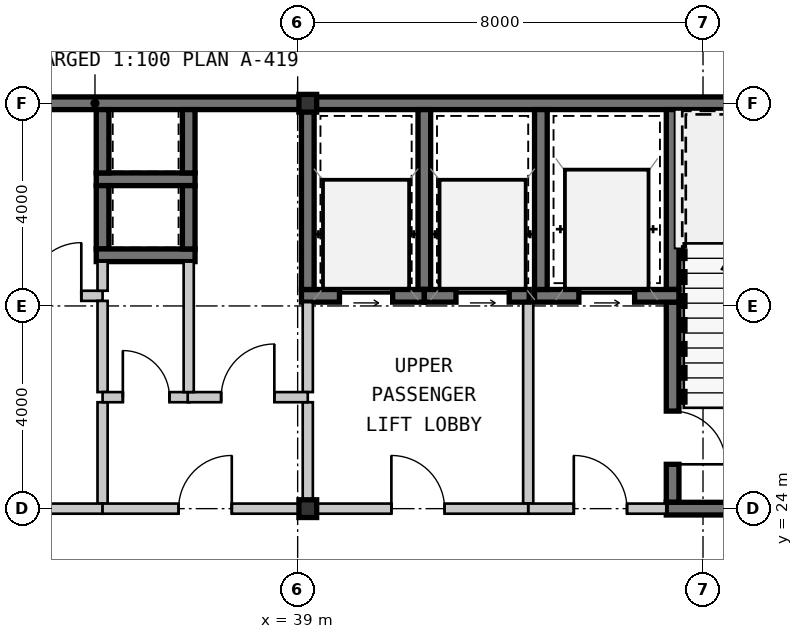
"""IFC4 building model, lengths in metres.
Left out: names, types, materials, properties, quantities, classifications, styles, units other than length and angle.
Written with IfcOpenShell. Run it as: python <this file> out.ifc"""

import sys

from ifc_helpers import new_model, si_unit, direction, frame, frame_2d, origin, origin_2d, place, context, subcontext, project, spatial, rectangle, hollow_rectangle, extrude, source, transform, mapped, element, fill, save


model = new_model("IFC4")
c1 = context("Model", 3, precision=1e-05, world=origin(), true_north=direction((0.0, 1.0)))
c2 = subcontext(c1, "Body", "Model", "MODEL_VIEW")
j1 = project(units=[si_unit("LENGTHUNIT", "METRE"), si_unit("PLANEANGLEUNIT", "RADIAN")], contexts=[c1])
p1 = place(None, origin())
s1 = spatial("IfcSite", under=j1, at=p1, CompositionType="ELEMENT")
p2 = place(p1, origin())
s2 = spatial("IfcBuilding", under=s1, at=p2, CompositionType="ELEMENT")
p3 = place(p2, frame((0.0, 0.0, 178.85)))
s3 = spatial("IfcBuildingStorey", under=s2, at=p3, CompositionType="ELEMENT", Elevation=178.85)
m1 = source(origin(), c2, "Body", "SweptSolid", [
    extrude(hollow_rectangle(XDim=0.35, YDim=0.35, WallThickness=0.016, at=origin_2d()), origin(), (0.0, 0.0, 1.0), 3.15),
])
for number, where, z_axis, x_axis in (
    (1, (39.2, 24.0, 0.0), (0.0, 0.0, 1.0), (1.0, 0.0, 0.0)),
    (2, (39.2, 32.0, 0.0), (0.0, 0.0, 1.0), (1.0, 0.0, 0.0)),
):
    element("IfcColumn", number, at=place(p3, frame(where, z_axis=z_axis, x_axis=x_axis)), inside=s3, PredefinedType="COLUMN", context=c2, shape_type="MappedRepresentation", body=[
        mapped(m1, transform((0.0, 0.0, 0.0), scale=1.0)),
    ])
m2 = source(origin(), c2, "Body", "SweptSolid", [
    extrude(rectangle(XDim=11.2, YDim=0.25, at=frame_2d((5.6, 0.0))), origin(), (0.0, 0.0, 1.0), 2.93),
])
p4 = place(p3, frame((28.0, 32.0, 0.0), z_axis=(0.0, 0.0, 1.0), x_axis=(1.0, 0.0, 0.0)))
e3 = element("IfcWall", 3, at=p4, inside=s3, PredefinedType="SHEAR", context=c2, shape_type="MappedRepresentation", body=[
    mapped(m2, transform((0.0, 0.0, 0.0), scale=1.0)),
])
m3 = source(origin(), c2, "Body", "SweptSolid", [
    extrude(rectangle(XDim=11.925, YDim=0.25, at=frame_2d((5.962, 0.0))), origin(), (0.0, 0.0, 1.0), 2.93),
])
p5 = place(p3, frame((39.2, 32.0, 0.0), z_axis=(0.0, 0.0, 1.0), x_axis=(1.0, 0.0, 0.0)))
e4 = element("IfcWall", 4, at=p5, inside=s3, PredefinedType="SHEAR", context=c2, shape_type="MappedRepresentation", body=[
    mapped(m3, transform((0.0, 0.0, 0.0), scale=1.0)),
])
m4 = source(origin(), c2, "Body", "SweptSolid", [
    extrude(rectangle(XDim=3.55, YDim=0.25, at=frame_2d((1.775, 0.0))), origin(), (0.0, 0.0, 1.0), 2.93),
])
p6 = place(p3, frame((46.4, 31.875, 0.0), z_axis=(0.0, 0.0, 1.0), x_axis=(0.0, -1.0, 0.0)))
e5 = element("IfcWall", 5, at=p6, inside=s3, PredefinedType="SHEAR", context=c2, shape_type="MappedRepresentation", body=[
    mapped(m4, transform((0.0, 0.0, 0.0), scale=1.0)),
])
m5 = source(origin(), c2, "Body", "SweptSolid", [
    extrude(rectangle(XDim=3.95, YDim=0.25, at=frame_2d((1.975, 0.0))), origin(), (0.0, 0.0, 1.0), 2.93),
])
p7 = place(p3, frame((46.4, 28.075, 0.0), z_axis=(0.0, 0.0, 1.0), x_axis=(0.0, -1.0, 0.0)))
e6 = element("IfcWall", 6, at=p7, inside=s3, PredefinedType="SHEAR", context=c2, shape_type="MappedRepresentation", body=[
    mapped(m5, transform((0.0, 0.0, 0.0), scale=1.0)),
])
m6 = source(origin(), c2, "Body", "SweptSolid", [
    extrude(rectangle(XDim=1.05, YDim=2.1, at=frame_2d((0.525, 1.05))), frame((0.0, 0.135, 0.0), z_axis=(0.0, -1.0, 0.0), x_axis=(1.0, 0.0, 0.0)), (0.0, 0.0, 1.0), 0.27),
])
p8 = place(p7, frame((2.15, 0.0, 0.0)))
e7 = element("IfcOpeningElement", 7, at=p8, cuts=e6, PredefinedType="OPENING", context=c2, shape_type="MappedRepresentation", body=[
    mapped(m6, transform((0.0, 0.0, 0.0), scale=1.0)),
])
m7 = source(origin(), c2, "Body", "SweptSolid", [
    extrude(rectangle(XDim=4.85, YDim=0.25, at=frame_2d((2.425, 0.0))), origin(), (0.0, 0.0, 1.0), 2.93),
])
p9 = place(p3, frame((46.275, 24.0, 0.0), z_axis=(0.0, 0.0, 1.0), x_axis=(1.0, 0.0, 0.0)))
e8 = element("IfcWall", 8, at=p9, inside=s3, PredefinedType="SHEAR", context=c2, shape_type="MappedRepresentation", body=[
    mapped(m7, transform((0.0, 0.0, 0.0), scale=1.0)),
])
m8 = source(origin(), c2, "Body", "SweptSolid", [
    extrude(rectangle(XDim=2.85, YDim=0.25, at=frame_2d((1.425, 0.0))), origin(), (0.0, 0.0, 1.0), 2.93),
])
p10 = place(p3, frame((43.675, 28.2, 0.0), z_axis=(0.0, 0.0, 1.0), x_axis=(1.0, 0.0, 0.0)))
e9 = element("IfcWall", 9, at=p10, inside=s3, PredefinedType="SHEAR", context=c2, shape_type="MappedRepresentation", body=[
    mapped(m8, transform((0.0, 0.0, 0.0), scale=1.0)),
])
m9 = source(origin(), c2, "Body", "SweptSolid", [
    extrude(rectangle(XDim=1.1, YDim=2.15, at=frame_2d((0.55, 1.075))), frame((0.0, 0.135, 0.0), z_axis=(0.0, -1.0, 0.0), x_axis=(1.0, 0.0, 0.0)), (0.0, 0.0, 1.0), 0.27),
])
p11 = place(p10, frame((0.875, 0.0, 0.0)))
e10 = element("IfcOpeningElement", 10, at=p11, cuts=e9, PredefinedType="OPENING", context=c2, shape_type="MappedRepresentation", body=[
    mapped(m9, transform((0.0, 0.0, 0.0), scale=1.0)),
])
p12 = place(p3, frame((43.8, 31.875, 0.0), z_axis=(0.0, 0.0, 1.0), x_axis=(0.0, -1.0, 0.0)))
e11 = element("IfcWall", 11, at=p12, inside=s3, PredefinedType="SHEAR", context=c2, shape_type="MappedRepresentation", body=[
    mapped(m4, transform((0.0, 0.0, 0.0), scale=1.0)),
])
m10 = source(origin(), c2, "Body", "SweptSolid", [
    extrude(rectangle(XDim=3.975, YDim=0.2, at=frame_2d((1.987, 0.0))), origin(), (0.0, 0.0, 1.0), 2.93),
])
p13 = place(p3, frame((43.55, 28.075, 0.0), z_axis=(0.0, 0.0, 1.0), x_axis=(0.0, -1.0, 0.0)))
e12 = element("IfcWall", 12, at=p13, inside=s3, PredefinedType="SOLIDWALL", context=c2, shape_type="MappedRepresentation", body=[
    mapped(m10, transform((0.0, 0.0, 0.0), scale=1.0)),
])
m11 = source(origin(), c2, "Body", "SweptSolid", [
    extrude(rectangle(XDim=2.725, YDim=0.2, at=frame_2d((1.362, 0.0))), origin(), (0.0, 0.0, 1.0), 2.397),
])
p14 = place(p3, frame((43.55, 24.0, 0.0), z_axis=(0.0, 0.0, 1.0), x_axis=(1.0, 0.0, 0.0)))
e13 = element("IfcWall", 13, at=p14, inside=s3, PredefinedType="SOLIDWALL", context=c2, shape_type="MappedRepresentation", body=[
    mapped(m11, transform((0.0, 0.0, 0.0), scale=1.0)),
])
m12 = source(origin(), c2, "Body", "SweptSolid", [
    extrude(rectangle(XDim=1.05, YDim=2.1, at=frame_2d((0.525, 1.05))), frame((0.0, 0.11, 0.0), z_axis=(0.0, -1.0, 0.0), x_axis=(1.0, 0.0, 0.0)), (0.0, 0.0, 1.0), 0.22),
])
p15 = place(p14, frame((0.9, 0.0, 0.0)))
e14 = element("IfcOpeningElement", 14, at=p15, cuts=e13, PredefinedType="OPENING", context=c2, shape_type="MappedRepresentation", body=[
    mapped(m12, transform((0.0, 0.0, 0.0), scale=1.0)),
])
m13 = source(origin(), c2, "Body", "SweptSolid", [
    extrude(rectangle(XDim=1.95, YDim=0.25, at=frame_2d((0.975, 0.0))), origin(), (0.0, 0.0, 1.0), 2.93),
])
p16 = place(p3, frame((35.025, 30.5, 0.0), z_axis=(0.0, 0.0, 1.0), x_axis=(1.0, 0.0, 0.0)))
e15 = element("IfcWall", 15, at=p16, inside=s3, PredefinedType="SHEAR", context=c2, shape_type="MappedRepresentation", body=[
    mapped(m13, transform((0.0, 0.0, 0.0), scale=1.0)),
])
m14 = source(origin(), c2, "Body", "SweptSolid", [
    extrude(rectangle(XDim=1.25, YDim=0.25, at=frame_2d((0.625, 0.0))), origin(), (0.0, 0.0, 1.0), 2.93),
])
for number, where, z_axis, x_axis in (
    (16, (35.15, 31.875, 0.0), (0.0, 0.0, 1.0), (0.0, -1.0, 0.0)),
    (17, (36.85, 30.625, 0.0), (0.0, 0.0, 1.0), (0.0, 1.0, 0.0)),
    (18, (35.15, 30.375, 0.0), (0.0, 0.0, 1.0), (0.0, -1.0, 0.0)),
):
    element("IfcWall", number, at=place(p3, frame(where, z_axis=z_axis, x_axis=x_axis)), inside=s3, PredefinedType="SHEAR", context=c2, shape_type="MappedRepresentation", body=[
        mapped(m14, transform((0.0, 0.0, 0.0), scale=1.0)),
    ])
p17 = place(p3, frame((35.025, 29.0, 0.0), z_axis=(0.0, 0.0, 1.0), x_axis=(1.0, 0.0, 0.0)))
e19 = element("IfcWall", 19, at=p17, inside=s3, PredefinedType="SHEAR", context=c2, shape_type="MappedRepresentation", body=[
    mapped(m13, transform((0.0, 0.0, 0.0), scale=1.0)),
])
p18 = place(p3, frame((36.85, 29.125, 0.0), z_axis=(0.0, 0.0, 1.0), x_axis=(0.0, 1.0, 0.0)))
e20 = element("IfcWall", 20, at=p18, inside=s3, PredefinedType="SHEAR", context=c2, shape_type="MappedRepresentation", body=[
    mapped(m14, transform((0.0, 0.0, 0.0), scale=1.0)),
])
p19 = place(p3, frame((41.5, 28.325, 0.0), z_axis=(0.0, 0.0, 1.0), x_axis=(0.0, 1.0, 0.0)))
e21 = element("IfcWall", 21, at=p19, inside=s3, PredefinedType="SHEAR", context=c2, shape_type="MappedRepresentation", body=[
    mapped(m4, transform((0.0, 0.0, 0.0), scale=1.0)),
])
m15 = source(origin(), c2, "Body", "SweptSolid", [
    extrude(rectangle(XDim=2.425, YDim=0.25, at=frame_2d((1.212, 0.0))), origin(), (0.0, 0.0, 1.0), 2.93),
])
p20 = place(p3, frame((39.075, 28.2, 0.0), z_axis=(0.0, 0.0, 1.0), x_axis=(1.0, 0.0, 0.0)))
e22 = element("IfcWall", 22, at=p20, inside=s3, PredefinedType="SHEAR", context=c2, shape_type="MappedRepresentation", body=[
    mapped(m15, transform((0.0, 0.0, 0.0), scale=1.0)),
])
m16 = source(origin(), c2, "Body", "SweptSolid", [
    extrude(rectangle(XDim=1.05, YDim=2.15, at=frame_2d((0.525, 1.075))), frame((0.0, 0.135, 0.0), z_axis=(0.0, -1.0, 0.0), x_axis=(1.0, 0.0, 0.0)), (0.0, 0.0, 1.0), 0.27),
])
p21 = place(p20, frame((0.75, 0.0, 0.0)))
e23 = element("IfcOpeningElement", 23, at=p21, cuts=e22, PredefinedType="OPENING", context=c2, shape_type="MappedRepresentation", body=[
    mapped(m16, transform((0.0, 0.0, 0.0), scale=1.0)),
])
p22 = place(p3, frame((39.2, 31.875, 0.0), z_axis=(0.0, 0.0, 1.0), x_axis=(0.0, -1.0, 0.0)))
e24 = element("IfcWall", 24, at=p22, inside=s3, PredefinedType="SHEAR", context=c2, shape_type="MappedRepresentation", body=[
    mapped(m4, transform((0.0, 0.0, 0.0), scale=1.0)),
])
m17 = source(origin(), c2, "Body", "SweptSolid", [
    extrude(rectangle(XDim=2.07, YDim=0.25, at=frame_2d((1.035, 0.0))), origin(), (0.0, 0.0, 1.0), 2.93),
])
p23 = place(p3, frame((41.5, 28.2, 0.0), z_axis=(0.0, 0.0, 1.0), x_axis=(1.0, 0.0, 0.0)))
e25 = element("IfcWall", 25, at=p23, inside=s3, PredefinedType="SHEAR", context=c2, shape_type="MappedRepresentation", body=[
    mapped(m17, transform((0.0, 0.0, 0.0), scale=1.0)),
])
p24 = place(p23, frame((0.625, 0.0, 0.0)))
e26 = element("IfcOpeningElement", 26, at=p24, cuts=e25, PredefinedType="OPENING", context=c2, shape_type="MappedRepresentation", body=[
    mapped(m16, transform((0.0, 0.0, 0.0), scale=1.0)),
])
m18 = source(origin(), c2, "Body", "SweptSolid", [
    extrude(rectangle(XDim=2.0, YDim=0.2, at=frame_2d((1.0, 0.0))), origin(), (0.0, 0.0, 1.0), 2.47),
])
p25 = place(p3, frame((39.2, 24.1, 0.0), z_axis=(0.0, 0.0, 1.0), x_axis=(0.0, 1.0, 0.0)))
e27 = element("IfcWall", 27, at=p25, inside=s3, PredefinedType="SOLIDWALL", context=c2, shape_type="MappedRepresentation", body=[
    mapped(m18, transform((0.0, 0.0, 0.0), scale=1.0)),
])
m19 = source(origin(), c2, "Body", "SweptSolid", [
    extrude(rectangle(XDim=1.775, YDim=0.2, at=frame_2d((0.887, 0.0))), origin(), (0.0, 0.0, 1.0), 2.47),
])
p26 = place(p3, frame((39.2, 26.3, 0.0), z_axis=(0.0, 0.0, 1.0), x_axis=(0.0, 1.0, 0.0)))
e28 = element("IfcWall", 28, at=p26, inside=s3, PredefinedType="SOLIDWALL", context=c2, shape_type="MappedRepresentation", body=[
    mapped(m19, transform((0.0, 0.0, 0.0), scale=1.0)),
])
m20 = source(origin(), c2, "Body", "SweptSolid", [
    extrude(rectangle(XDim=4.35, YDim=0.2, at=frame_2d((2.175, 0.0))), origin(), (0.0, 0.0, 1.0), 2.397),
])
p27 = place(p3, frame((43.55, 24.0, 0.0), z_axis=(0.0, 0.0, 1.0), x_axis=(-1.0, 0.0, 0.0)))
e29 = element("IfcWall", 29, at=p27, inside=s3, PredefinedType="SOLIDWALL", context=c2, shape_type="MappedRepresentation", body=[
    mapped(m20, transform((0.0, 0.0, 0.0), scale=1.0)),
])
p28 = place(p27, frame((1.65, 0.0, 0.0)))
e30 = element("IfcOpeningElement", 30, at=p28, cuts=e29, PredefinedType="OPENING", context=c2, shape_type="MappedRepresentation", body=[
    mapped(m12, transform((0.0, 0.0, 0.0), scale=1.0)),
])
m21 = source(origin(), c2, "Body", "SweptSolid", [
    extrude(rectangle(XDim=4.35, YDim=0.2, at=frame_2d((2.175, 0.0))), origin(), (0.0, 0.0, 1.0), 2.93),
])
p29 = place(p3, frame((30.8, 28.2, 0.0), z_axis=(0.0, 0.0, 1.0), x_axis=(1.0, 0.0, 0.0)))
e31 = element("IfcWall", 31, at=p29, inside=s3, PredefinedType="SOLIDWALL", context=c2, shape_type="MappedRepresentation", body=[
    mapped(m21, transform((0.0, 0.0, 0.0), scale=1.0)),
])
p30 = place(p29, frame((2.88, 0.0, 0.0)))
e32 = element("IfcOpeningElement", 32, at=p30, cuts=e31, PredefinedType="OPENING", context=c2, shape_type="MappedRepresentation", body=[
    mapped(m12, transform((0.0, 0.0, 0.0), scale=1.0)),
])
m22 = source(origin(), c2, "Body", "SweptSolid", [
    extrude(rectangle(XDim=2.0, YDim=0.2, at=frame_2d((1.0, 0.0))), origin(), (0.0, 0.0, 1.0), 2.93),
])
p31 = place(p3, frame((35.15, 26.1, 0.0), z_axis=(0.0, 0.0, 1.0), x_axis=(0.0, -1.0, 0.0)))
e33 = element("IfcWall", 33, at=p31, inside=s3, PredefinedType="SOLIDWALL", context=c2, shape_type="MappedRepresentation", body=[
    mapped(m22, transform((0.0, 0.0, 0.0), scale=1.0)),
])
m23 = source(origin(), c2, "Body", "SweptSolid", [
    extrude(rectangle(XDim=1.8, YDim=0.2, at=frame_2d((0.9, 0.0))), origin(), (0.0, 0.0, 1.0), 2.93),
])
p32 = place(p3, frame((35.15, 28.1, 0.0), z_axis=(0.0, 0.0, 1.0), x_axis=(0.0, -1.0, 0.0)))
e34 = element("IfcWall", 34, at=p32, inside=s3, PredefinedType="SOLIDWALL", context=c2, shape_type="MappedRepresentation", body=[
    mapped(m23, transform((0.0, 0.0, 0.0), scale=1.0)),
])
m24 = source(origin(), c2, "Body", "SweptSolid", [
    extrude(rectangle(XDim=4.35, YDim=0.2, at=frame_2d((2.175, 0.0))), origin(), (0.0, 0.0, 1.0), 2.47),
])
p33 = place(p3, frame((35.15, 24.0, 0.0), z_axis=(0.0, 0.0, 1.0), x_axis=(-1.0, 0.0, 0.0)))
e35 = element("IfcWall", 35, at=p33, inside=s3, PredefinedType="SOLIDWALL", context=c2, shape_type="MappedRepresentation", body=[
    mapped(m24, transform((0.0, 0.0, 0.0), scale=1.0)),
])
p34 = place(p33, frame((1.65, 0.0, 0.0)))
e36 = element("IfcOpeningElement", 36, at=p34, cuts=e35, PredefinedType="OPENING", context=c2, shape_type="MappedRepresentation", body=[
    mapped(m12, transform((0.0, 0.0, 0.0), scale=1.0)),
])
m25 = source(origin(), c2, "Body", "SweptSolid", [
    extrude(rectangle(XDim=0.575, YDim=0.2, at=frame_2d((0.288, 0.0))), origin(), (0.0, 0.0, 1.0), 2.93),
])
p35 = place(p3, frame((35.15, 28.875, 0.0), z_axis=(0.0, 0.0, 1.0), x_axis=(0.0, -1.0, 0.0)))
e37 = element("IfcWall", 37, at=p35, inside=s3, PredefinedType="SOLIDWALL", context=c2, shape_type="MappedRepresentation", body=[
    mapped(m25, transform((0.0, 0.0, 0.0), scale=1.0)),
])
m26 = source(origin(), c2, "Body", "SweptSolid", [
    extrude(rectangle(XDim=1.72, YDim=0.2, at=frame_2d((0.86, 0.0))), origin(), (0.0, 0.0, 1.0), 2.93),
])
p36 = place(p3, frame((35.15, 26.2, 0.0), z_axis=(0.0, 0.0, 1.0), x_axis=(1.0, 0.0, 0.0)))
e38 = element("IfcWall", 38, at=p36, inside=s3, PredefinedType="SOLIDWALL", context=c2, shape_type="MappedRepresentation", body=[
    mapped(m26, transform((0.0, 0.0, 0.0), scale=1.0)),
])
m27 = source(origin(), c2, "Body", "SweptSolid", [
    extrude(rectangle(XDim=0.92, YDim=2.1, at=frame_2d((0.46, 1.05))), frame((0.0, 0.11, 0.0), z_axis=(0.0, -1.0, 0.0), x_axis=(1.0, 0.0, 0.0)), (0.0, 0.0, 1.0), 0.22),
])
p37 = place(p36, frame((0.4, 0.0, 0.0)))
e39 = element("IfcOpeningElement", 39, at=p37, cuts=e38, PredefinedType="OPENING", context=c2, shape_type="MappedRepresentation", body=[
    mapped(m27, transform((0.0, 0.0, 0.0), scale=1.0)),
])
m28 = source(origin(), c2, "Body", "SweptSolid", [
    extrude(rectangle(XDim=2.37, YDim=0.2, at=frame_2d((1.185, 0.0))), origin(), (0.0, 0.0, 1.0), 2.93),
])
p38 = place(p3, frame((36.83, 26.2, 0.0), z_axis=(0.0, 0.0, 1.0), x_axis=(1.0, 0.0, 0.0)))
e40 = element("IfcWall", 40, at=p38, inside=s3, PredefinedType="SOLIDWALL", context=c2, shape_type="MappedRepresentation", body=[
    mapped(m28, transform((0.0, 0.0, 0.0), scale=1.0)),
])
p39 = place(p38, frame((0.66, 0.0, 0.0)))
e41 = element("IfcOpeningElement", 41, at=p39, cuts=e40, PredefinedType="OPENING", context=c2, shape_type="MappedRepresentation", body=[
    mapped(m12, transform((0.0, 0.0, 0.0), scale=1.0)),
])
m29 = source(origin(), c2, "Body", "SweptSolid", [
    extrude(rectangle(XDim=4.05, YDim=0.2, at=frame_2d((2.025, 0.0))), origin(), (0.0, 0.0, 1.0), 2.47),
])
p40 = place(p3, frame((39.2, 24.0, 0.0), z_axis=(0.0, 0.0, 1.0), x_axis=(-1.0, 0.0, 0.0)))
e42 = element("IfcWall", 42, at=p40, inside=s3, PredefinedType="SOLIDWALL", context=c2, shape_type="MappedRepresentation", body=[
    mapped(m29, transform((0.0, 0.0, 0.0), scale=1.0)),
])
p41 = place(p40, frame((1.5, 0.0, 0.0)))
e43 = element("IfcOpeningElement", 43, at=p41, cuts=e42, PredefinedType="OPENING", context=c2, shape_type="MappedRepresentation", body=[
    mapped(m12, transform((0.0, 0.0, 0.0), scale=1.0)),
])
m30 = source(origin(), c2, "Body", "SweptSolid", [
    extrude(rectangle(XDim=2.575, YDim=0.2, at=frame_2d((1.288, 0.0))), origin(), (0.0, 0.0, 1.0), 2.93),
])
p42 = place(p3, frame((36.85, 28.875, 0.0), z_axis=(0.0, 0.0, 1.0), x_axis=(0.0, -1.0, 0.0)))
e44 = element("IfcWall", 44, at=p42, inside=s3, PredefinedType="SOLIDWALL", context=c2, shape_type="MappedRepresentation", body=[
    mapped(m30, transform((0.0, 0.0, 0.0), scale=1.0)),
])
m31 = source(origin(), c2, "Body", "SweptSolid", [
    extrude(rectangle(XDim=1.05, YDim=2.1, at=frame_2d((0.525, 1.05))), frame((0.0, 0.025, 0.0), z_axis=(0.0, -1.0, 0.0), x_axis=(1.0, 0.0, 0.0)), (0.0, 0.0, 1.0), 0.05),
])
p43 = place(p8, origin())
e45 = element("IfcDoor", 45, at=p43, inside=s3, OperationType="SINGLE_SWING_RIGHT", PredefinedType="DOOR", context=c2, shape_type="MappedRepresentation", body=[
    mapped(m31, transform((0.0, 0.0, 0.0), scale=1.0)),
])
fill(e7, e45)
m32 = source(origin(), c2, "Body", "SweptSolid", [
    extrude(rectangle(XDim=1.1, YDim=2.15, at=frame_2d((0.55, 1.075))), frame((0.0, 0.025, 0.0), z_axis=(0.0, -1.0, 0.0), x_axis=(1.0, 0.0, 0.0)), (0.0, 0.0, 1.0), 0.05),
])
p44 = place(p11, origin())
e46 = element("IfcDoor", 46, at=p44, inside=s3, OperationType="SLIDING_TO_LEFT", PredefinedType="DOOR", context=c2, shape_type="MappedRepresentation", body=[
    mapped(m32, transform((0.0, 0.0, 0.0), scale=1.0)),
])
fill(e10, e46)
p45 = place(p15, origin())
e47 = element("IfcDoor", 47, at=p45, inside=s3, OperationType="SINGLE_SWING_LEFT", PredefinedType="DOOR", context=c2, shape_type="MappedRepresentation", body=[
    mapped(m31, transform((0.0, 0.0, 0.0), scale=1.0)),
])
fill(e14, e47)
m33 = source(origin(), c2, "Body", "SweptSolid", [
    extrude(rectangle(XDim=1.05, YDim=2.15, at=frame_2d((0.525, 1.075))), frame((0.0, 0.025, 0.0), z_axis=(0.0, -1.0, 0.0), x_axis=(1.0, 0.0, 0.0)), (0.0, 0.0, 1.0), 0.05),
])
p46 = place(p21, origin())
e48 = element("IfcDoor", 48, at=p46, inside=s3, OperationType="SLIDING_TO_LEFT", PredefinedType="DOOR", context=c2, shape_type="MappedRepresentation", body=[
    mapped(m33, transform((0.0, 0.0, 0.0), scale=1.0)),
])
fill(e23, e48)
p47 = place(p24, origin())
e49 = element("IfcDoor", 49, at=p47, inside=s3, OperationType="SLIDING_TO_LEFT", PredefinedType="DOOR", context=c2, shape_type="MappedRepresentation", body=[
    mapped(m33, transform((0.0, 0.0, 0.0), scale=1.0)),
])
fill(e26, e49)
p48 = place(p28, frame((1.05, 0.0, 0.0), z_axis=(0.0, 0.0, 1.0), x_axis=(-1.0, 0.0, 0.0)))
e50 = element("IfcDoor", 50, at=p48, inside=s3, OperationType="SINGLE_SWING_LEFT", PredefinedType="DOOR", context=c2, shape_type="MappedRepresentation", body=[
    mapped(m31, transform((0.0, 0.0, 0.0), scale=1.0)),
])
fill(e30, e50)
p49 = place(p30, origin())
e51 = element("IfcDoor", 51, at=p49, inside=s3, OperationType="SINGLE_SWING_RIGHT", PredefinedType="DOOR", context=c2, shape_type="MappedRepresentation", body=[
    mapped(m31, transform((0.0, 0.0, 0.0), scale=1.0)),
])
fill(e32, e51)
m34 = source(origin(), c2, "Body", "SweptSolid", [
    extrude(rectangle(XDim=0.92, YDim=2.1, at=frame_2d((0.46, 1.05))), frame((0.0, 0.025, 0.0), z_axis=(0.0, -1.0, 0.0), x_axis=(1.0, 0.0, 0.0)), (0.0, 0.0, 1.0), 0.05),
])
p50 = place(p37, origin())
e52 = element("IfcDoor", 52, at=p50, inside=s3, OperationType="SINGLE_SWING_LEFT", PredefinedType="DOOR", context=c2, shape_type="MappedRepresentation", body=[
    mapped(m34, transform((0.0, 0.0, 0.0), scale=1.0)),
])
fill(e39, e52)
p51 = place(p39, origin())
e53 = element("IfcDoor", 53, at=p51, inside=s3, OperationType="SINGLE_SWING_RIGHT", PredefinedType="DOOR", context=c2, shape_type="MappedRepresentation", body=[
    mapped(m31, transform((0.0, 0.0, 0.0), scale=1.0)),
])
fill(e41, e53)
p52 = place(p41, frame((1.05, 0.0, 0.0), z_axis=(0.0, 0.0, 1.0), x_axis=(-1.0, 0.0, 0.0)))
e54 = element("IfcDoor", 54, at=p52, inside=s3, OperationType="SINGLE_SWING_RIGHT", PredefinedType="DOOR", context=c2, shape_type="MappedRepresentation", body=[
    mapped(m31, transform((0.0, 0.0, 0.0), scale=1.0)),
])
fill(e43, e54)
save(model, sys.argv[1])
